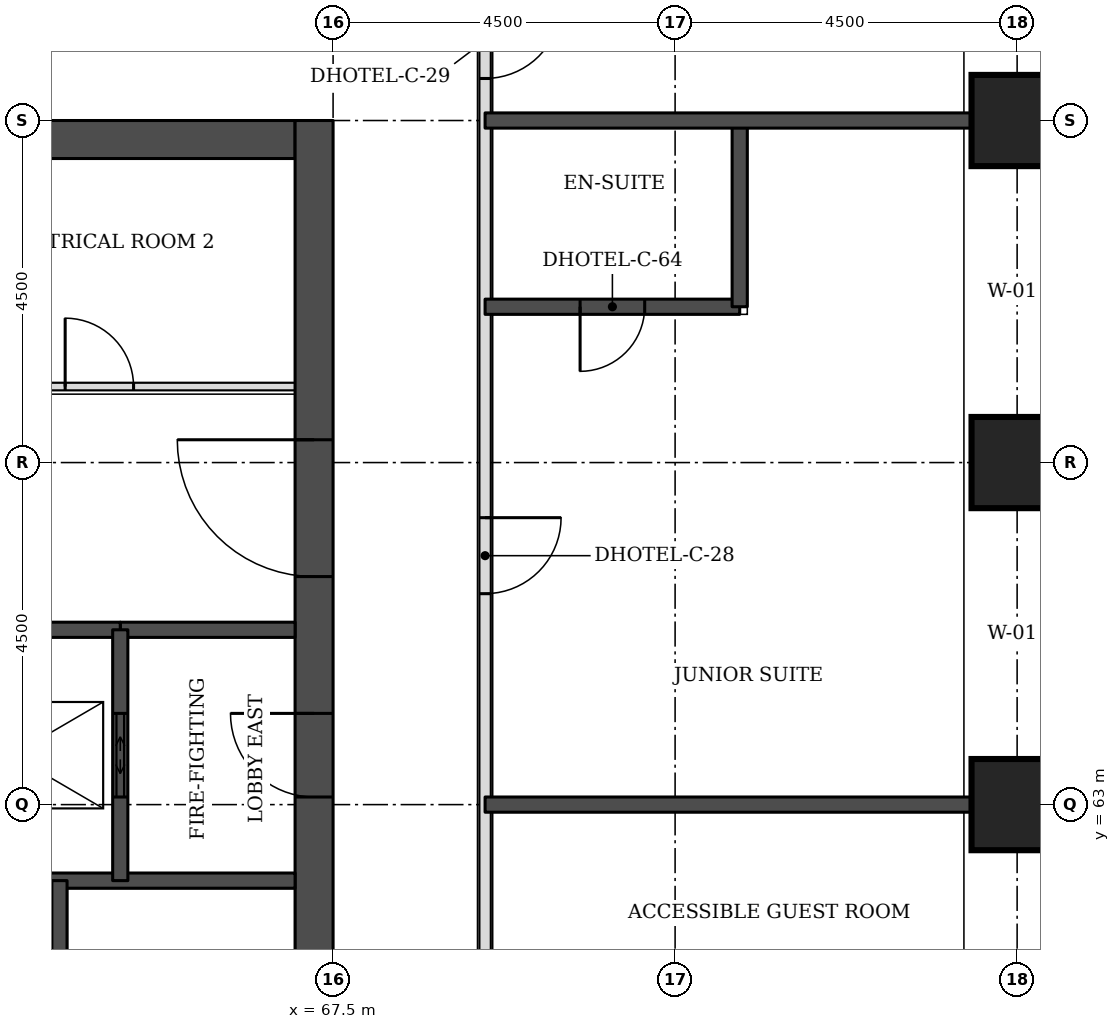
"""IFC4 building model, lengths in metres.
Left out: names, types, materials, properties, quantities, classifications, styles, units other than length and angle.
Written with IfcOpenShell. Run it as: python <this file> out.ifc"""

import sys

from ifc_helpers import new_model, si_unit, direction, frame, frame_2d, origin, origin_2d, place, context, subcontext, project, spatial, rectangle, extrude, element, fill, save


model = new_model("IFC4")
c1 = context("Model", 3, precision=1e-05, world=origin(), true_north=direction((0.0, 1.0)))
c2 = subcontext(c1, "Body", "Model", "MODEL_VIEW")
j1 = project(units=[si_unit("LENGTHUNIT", "METRE"), si_unit("PLANEANGLEUNIT", "RADIAN")], contexts=[c1])
p1 = place(None, origin())
s1 = spatial("IfcSite", under=j1, at=p1, CompositionType="ELEMENT")
p2 = place(p1, origin())
s2 = spatial("IfcBuilding", under=s1, at=p2, CompositionType="ELEMENT")
p3 = place(p2, frame((0.0, 0.0, 56.1)))
s3 = spatial("IfcBuildingStorey", under=s2, at=p3, CompositionType="ELEMENT", Elevation=56.1)
for number, where, z_axis, x_axis in (
    (1, (76.5, 63.0, 0.0), (0.0, 0.0, 1.0), (1.0, 0.0, 0.0)),
    (2, (76.5, 67.5, 0.0), (0.0, 0.0, 1.0), (1.0, 0.0, 0.0)),
    (3, (76.5, 72.0, 0.0), (0.0, 0.0, 1.0), (1.0, 0.0, 0.0)),
):
    element("IfcColumn", number, at=place(p3, frame(where, z_axis=z_axis, x_axis=x_axis)), inside=s3, PredefinedType="COLUMN", context=c2, shape_type="SweptSolid", body=[
        extrude(rectangle(XDim=1.2, YDim=1.2, at=origin_2d()), origin(), (0.0, 0.0, 1.0), 3.3),
    ])
p4 = place(p3, frame((45.5, 71.75, 0.0), z_axis=(0.0, 0.0, 1.0), x_axis=(1.0, 0.0, 0.0)))
e4 = element("IfcWall", 4, at=p4, inside=s3, PredefinedType="SHEAR", context=c2, shape_type="SweptSolid", body=[
    extrude(rectangle(XDim=21.5, YDim=0.5, at=frame_2d((10.75, 0.0))), origin(), (0.0, 0.0, 1.0), 3.3),
])
p5 = place(p3, frame((67.25, 49.5, 0.0), z_axis=(0.0, 0.0, 1.0), x_axis=(0.0, 1.0, 0.0)))
e5 = element("IfcWall", 5, at=p5, inside=s3, PredefinedType="SHEAR", context=c2, shape_type="SweptSolid", body=[
    extrude(rectangle(XDim=22.5, YDim=0.5, at=frame_2d((11.25, 0.0))), origin(), (0.0, 0.0, 1.0), 3.3),
])
p6 = place(p5, frame((4.2, 0.0, 0.0)))
e6 = element("IfcOpeningElement", 6, at=p6, cuts=e5, PredefinedType="OPENING", context=c2, shape_type="SweptSolid", body=[
    extrude(rectangle(XDim=1.8, YDim=2.1, at=frame_2d((0.9, 1.05))), frame((0.0, 0.26, 0.0), z_axis=(0.0, -1.0, 0.0), x_axis=(1.0, 0.0, 0.0)), (0.0, 0.0, 1.0), 0.52),
])
p7 = place(p5, frame((6.9, 0.0, 0.0)))
e7 = element("IfcOpeningElement", 7, at=p7, cuts=e5, PredefinedType="OPENING", context=c2, shape_type="SweptSolid", body=[
    extrude(rectangle(XDim=1.1, YDim=2.1, at=frame_2d((0.55, 1.05))), frame((0.0, 0.26, 0.0), z_axis=(0.0, -1.0, 0.0), x_axis=(1.0, 0.0, 0.0)), (0.0, 0.0, 1.0), 0.52),
])
p8 = place(p5, frame((13.6, 0.0, 0.0)))
e8 = element("IfcOpeningElement", 8, at=p8, cuts=e5, PredefinedType="OPENING", context=c2, shape_type="SweptSolid", body=[
    extrude(rectangle(XDim=1.1, YDim=2.1, at=frame_2d((0.55, 1.05))), frame((0.0, 0.26, 0.0), z_axis=(0.0, -1.0, 0.0), x_axis=(1.0, 0.0, 0.0)), (0.0, 0.0, 1.0), 0.52),
])
p9 = place(p5, frame((16.5, 0.0, 0.0)))
e9 = element("IfcOpeningElement", 9, at=p9, cuts=e5, PredefinedType="OPENING", context=c2, shape_type="SweptSolid", body=[
    extrude(rectangle(XDim=1.8, YDim=2.1, at=frame_2d((0.9, 1.05))), frame((0.0, 0.26, 0.0), z_axis=(0.0, -1.0, 0.0), x_axis=(1.0, 0.0, 0.0)), (0.0, 0.0, 1.0), 0.52),
])
p10 = place(p3, frame((69.5, 47.5, 0.0), z_axis=(0.0, 0.0, 1.0), x_axis=(0.0, 1.0, 0.0)))
e10 = element("IfcWall", 10, at=p10, inside=s3, PredefinedType="PARTITIONING", context=c2, shape_type="SweptSolid", body=[
    extrude(rectangle(XDim=26.5, YDim=0.15, at=frame_2d((13.25, 0.0))), origin(), (0.0, 0.0, 1.0), 3.08),
])
p11 = place(p10, frame((25.053, 0.0, 0.0)))
e11 = element("IfcOpeningElement", 11, at=p11, cuts=e10, PredefinedType="OPENING", context=c2, shape_type="SweptSolid", body=[
    extrude(rectangle(XDim=1.0, YDim=2.1, at=frame_2d((0.5, 1.05))), frame((0.0, 0.085, 0.0), z_axis=(0.0, -1.0, 0.0), x_axis=(1.0, 0.0, 0.0)), (0.0, 0.0, 1.0), 0.17),
])
p12 = place(p10, frame((18.275, 0.0, 0.0)))
e12 = element("IfcOpeningElement", 12, at=p12, cuts=e10, PredefinedType="OPENING", context=c2, shape_type="SweptSolid", body=[
    extrude(rectangle(XDim=1.0, YDim=2.1, at=frame_2d((0.5, 1.05))), frame((0.0, 0.085, 0.0), z_axis=(0.0, -1.0, 0.0), x_axis=(1.0, 0.0, 0.0)), (0.0, 0.0, 1.0), 0.17),
])
p13 = place(p10, frame((12.15, 0.0, 0.0)))
e13 = element("IfcOpeningElement", 13, at=p13, cuts=e10, PredefinedType="OPENING", context=c2, shape_type="SweptSolid", body=[
    extrude(rectangle(XDim=1.1, YDim=2.1, at=frame_2d((0.55, 1.05))), frame((0.0, 0.085, 0.0), z_axis=(0.0, -1.0, 0.0), x_axis=(1.0, 0.0, 0.0)), (0.0, 0.0, 1.0), 0.17),
])
p14 = place(p10, frame((2.825, 0.0, 0.0)))
e14 = element("IfcOpeningElement", 14, at=p14, cuts=e10, PredefinedType="OPENING", context=c2, shape_type="SweptSolid", body=[
    extrude(rectangle(XDim=1.0, YDim=2.1, at=frame_2d((0.5, 1.05))), frame((0.0, 0.085, 0.0), z_axis=(0.0, -1.0, 0.0), x_axis=(1.0, 0.0, 0.0)), (0.0, 0.0, 1.0), 0.17),
])
p15 = place(p10, frame((0.447, 0.0, 0.0)))
e15 = element("IfcOpeningElement", 15, at=p15, cuts=e10, PredefinedType="OPENING", context=c2, shape_type="SweptSolid", body=[
    extrude(rectangle(XDim=1.0, YDim=2.1, at=frame_2d((0.5, 1.05))), frame((0.0, 0.085, 0.0), z_axis=(0.0, -1.0, 0.0), x_axis=(1.0, 0.0, 0.0)), (0.0, 0.0, 1.0), 0.17),
])
p16 = place(p3, frame((69.5, 63.0, 0.0), z_axis=(0.0, 0.0, 1.0), x_axis=(1.0, 0.0, 0.0)))
e16 = element("IfcWall", 16, at=p16, inside=s3, PredefinedType="SOLIDWALL", context=c2, shape_type="SweptSolid", body=[
    extrude(rectangle(XDim=6.4, YDim=0.2, at=frame_2d((3.2, 0.0))), origin(), (0.0, 0.0, 1.0), 3.08),
])
p17 = place(p3, frame((69.5, 69.55, 0.0), z_axis=(0.0, 0.0, 1.0), x_axis=(1.0, 0.0, 0.0)))
e17 = element("IfcWall", 17, at=p17, inside=s3, PredefinedType="SOLIDWALL", context=c2, shape_type="SweptSolid", body=[
    extrude(rectangle(XDim=3.35, YDim=0.2, at=frame_2d((1.675, 0.0))), origin(), (0.0, 0.0, 1.0), 3.08),
])
p18 = place(p17, frame((1.25, 0.0, 0.0)))
e18 = element("IfcOpeningElement", 18, at=p18, cuts=e17, PredefinedType="OPENING", context=c2, shape_type="SweptSolid", body=[
    extrude(rectangle(XDim=0.85, YDim=2.1, at=frame_2d((0.425, 1.05))), frame((0.0, 0.11, 0.0), z_axis=(0.0, -1.0, 0.0), x_axis=(1.0, 0.0, 0.0)), (0.0, 0.0, 1.0), 0.22),
])
p19 = place(p3, frame((72.85, 69.55, 0.0), z_axis=(0.0, 0.0, 1.0), x_axis=(0.0, 1.0, 0.0)))
e19 = element("IfcWall", 19, at=p19, inside=s3, PredefinedType="SOLIDWALL", context=c2, shape_type="SweptSolid", body=[
    extrude(rectangle(XDim=2.45, YDim=0.2, at=frame_2d((1.225, 0.0))), origin(), (0.0, 0.0, 1.0), 3.08),
])
p20 = place(p3, frame((69.5, 72.0, 0.0), z_axis=(0.0, 0.0, 1.0), x_axis=(1.0, 0.0, 0.0)))
e20 = element("IfcWall", 20, at=p20, inside=s3, PredefinedType="SOLIDWALL", context=c2, shape_type="SweptSolid", body=[
    extrude(rectangle(XDim=6.4, YDim=0.2, at=frame_2d((3.2, 0.0))), origin(), (0.0, 0.0, 1.0), 3.08),
])
p21 = place(p3, frame((61.85, 62.0, 0.0), z_axis=(0.0, 0.0, 1.0), x_axis=(1.0, 0.0, 0.0)))
e21 = element("IfcWall", 21, at=p21, inside=s3, PredefinedType="SOLIDWALL", context=c2, shape_type="SweptSolid", body=[
    extrude(rectangle(XDim=5.15, YDim=0.2, at=frame_2d((2.575, 0.0))), origin(), (0.0, 0.0, 1.0), 3.08),
])
p22 = place(p3, frame((64.7, 65.3, 0.0), z_axis=(0.0, 0.0, 1.0), x_axis=(1.0, 0.0, 0.0)))
e22 = element("IfcWall", 22, at=p22, inside=s3, PredefinedType="SOLIDWALL", context=c2, shape_type="SweptSolid", body=[
    extrude(rectangle(XDim=2.3, YDim=0.2, at=frame_2d((1.15, 0.0))), origin(), (0.0, 0.0, 1.0), 3.08),
])
p23 = place(p3, frame((47.8, 65.3, 0.0), z_axis=(0.0, 0.0, 1.0), x_axis=(1.0, 0.0, 0.0)))
e23 = element("IfcWall", 23, at=p23, inside=s3, PredefinedType="SOLIDWALL", context=c2, shape_type="SweptSolid", body=[
    extrude(rectangle(XDim=16.9, YDim=0.2, at=frame_2d((8.45, 0.0))), origin(), (0.0, 0.0, 1.0), 3.08),
])
p24 = place(p3, frame((61.85, 68.5, 0.0), z_axis=(0.0, 0.0, 1.0), x_axis=(1.0, 0.0, 0.0)))
e24 = element("IfcWall", 24, at=p24, inside=s3, PredefinedType="PARTITIONING", context=c2, shape_type="SweptSolid", body=[
    extrude(rectangle(XDim=5.15, YDim=0.1, at=frame_2d((2.575, 0.0))), origin(), (0.0, 0.0, 1.0), 3.08),
])
p25 = place(p24, frame((2.125, 0.0, 0.0)))
e25 = element("IfcOpeningElement", 25, at=p25, cuts=e24, PredefinedType="OPENING", context=c2, shape_type="SweptSolid", body=[
    extrude(rectangle(XDim=0.9, YDim=2.1, at=frame_2d((0.45, 1.05))), frame((0.0, 0.06, 0.0), z_axis=(0.0, -1.0, 0.0), x_axis=(1.0, 0.0, 0.0)), (0.0, 0.0, 1.0), 0.12),
])
p26 = place(p3, frame((63.9, 56.2, 0.0), z_axis=(0.0, 0.0, 1.0), x_axis=(0.0, 1.0, 0.0)))
e26 = element("IfcWall", 26, at=p26, inside=s3, PredefinedType="SOLIDWALL", context=c2, shape_type="SweptSolid", body=[
    extrude(rectangle(XDim=5.8, YDim=0.2, at=frame_2d((2.9, 0.0))), origin(), (0.0, 0.0, 1.0), 3.08),
])
p27 = place(p3, frame((64.7, 62.0, 0.0), z_axis=(0.0, 0.0, 1.0), x_axis=(0.0, 1.0, 0.0)))
e27 = element("IfcWall", 27, at=p27, inside=s3, PredefinedType="SOLIDWALL", context=c2, shape_type="SweptSolid", body=[
    extrude(rectangle(XDim=3.3, YDim=0.2, at=frame_2d((1.65, 0.0))), origin(), (0.0, 0.0, 1.0), 3.08),
])
p28 = place(p27, frame((1.1, 0.0, 0.0)))
e28 = element("IfcOpeningElement", 28, at=p28, cuts=e27, PredefinedType="OPENING", context=c2, shape_type="SweptSolid", body=[
    extrude(rectangle(XDim=1.1, YDim=2.1, at=frame_2d((0.55, 1.05))), frame((0.0, 0.11, 0.0), z_axis=(0.0, -1.0, 0.0), x_axis=(1.0, 0.0, 0.0)), (0.0, 0.0, 1.0), 0.22),
])
p29 = place(p11, frame((1.0, 0.0, 0.0), z_axis=(0.0, 0.0, 1.0), x_axis=(-1.0, 0.0, 0.0)))
e29 = element("IfcDoor", 29, at=p29, inside=s3, OperationType="SINGLE_SWING_LEFT", PredefinedType="DOOR", context=c2, shape_type="SweptSolid", body=[
    extrude(rectangle(XDim=1.0, YDim=2.1, at=frame_2d((0.5, 1.05))), frame((0.0, 0.025, 0.0), z_axis=(0.0, -1.0, 0.0), x_axis=(1.0, 0.0, 0.0)), (0.0, 0.0, 1.0), 0.05),
])
fill(e11, e29)
p30 = place(p12, frame((1.0, 0.0, 0.0), z_axis=(0.0, 0.0, 1.0), x_axis=(-1.0, 0.0, 0.0)))
e30 = element("IfcDoor", 30, at=p30, inside=s3, OperationType="SINGLE_SWING_LEFT", PredefinedType="DOOR", context=c2, shape_type="SweptSolid", body=[
    extrude(rectangle(XDim=1.0, YDim=2.1, at=frame_2d((0.5, 1.05))), frame((0.0, 0.025, 0.0), z_axis=(0.0, -1.0, 0.0), x_axis=(1.0, 0.0, 0.0)), (0.0, 0.0, 1.0), 0.05),
])
fill(e12, e30)
p31 = place(p18, frame((0.85, 0.0, 0.0), z_axis=(0.0, 0.0, 1.0), x_axis=(-1.0, 0.0, 0.0)))
e31 = element("IfcDoor", 31, at=p31, inside=s3, OperationType="SINGLE_SWING_RIGHT", PredefinedType="DOOR", context=c2, shape_type="SweptSolid", body=[
    extrude(rectangle(XDim=0.85, YDim=2.1, at=frame_2d((0.425, 1.05))), frame((0.0, 0.025, 0.0), z_axis=(0.0, -1.0, 0.0), x_axis=(1.0, 0.0, 0.0)), (0.0, 0.0, 1.0), 0.05),
])
fill(e18, e31)
p32 = place(p28, origin())
e32 = element("IfcDoor", 32, at=p32, inside=s3, OperationType="DOUBLE_DOOR_SLIDING", PredefinedType="DOOR", context=c2, shape_type="SweptSolid", body=[
    extrude(rectangle(XDim=1.1, YDim=2.1, at=frame_2d((0.55, 1.05))), frame((0.0, 0.025, 0.0), z_axis=(0.0, -1.0, 0.0), x_axis=(1.0, 0.0, 0.0)), (0.0, 0.0, 1.0), 0.05),
])
fill(e28, e32)
p33 = place(p8, origin())
e33 = element("IfcDoor", 33, at=p33, inside=s3, OperationType="SINGLE_SWING_RIGHT", PredefinedType="DOOR", context=c2, shape_type="SweptSolid", body=[
    extrude(rectangle(XDim=1.1, YDim=2.1, at=frame_2d((0.55, 1.05))), frame((0.0, 0.025, 0.0), z_axis=(0.0, -1.0, 0.0), x_axis=(1.0, 0.0, 0.0)), (0.0, 0.0, 1.0), 0.05),
])
fill(e8, e33)
p34 = place(p9, origin())
e34 = element("IfcDoor", 34, at=p34, inside=s3, OperationType="SINGLE_SWING_RIGHT", PredefinedType="DOOR", context=c2, shape_type="SweptSolid", body=[
    extrude(rectangle(XDim=1.8, YDim=2.1, at=frame_2d((0.9, 1.05))), frame((0.0, 0.025, 0.0), z_axis=(0.0, -1.0, 0.0), x_axis=(1.0, 0.0, 0.0)), (0.0, 0.0, 1.0), 0.05),
])
fill(e9, e34)
p35 = place(p25, origin())
e35 = element("IfcDoor", 35, at=p35, inside=s3, OperationType="SINGLE_SWING_LEFT", PredefinedType="DOOR", context=c2, shape_type="SweptSolid", body=[
    extrude(rectangle(XDim=0.9, YDim=2.1, at=frame_2d((0.45, 1.05))), frame((0.0, 0.025, 0.0), z_axis=(0.0, -1.0, 0.0), x_axis=(1.0, 0.0, 0.0)), (0.0, 0.0, 1.0), 0.05),
])
fill(e25, e35)
save(model, sys.argv[1])
